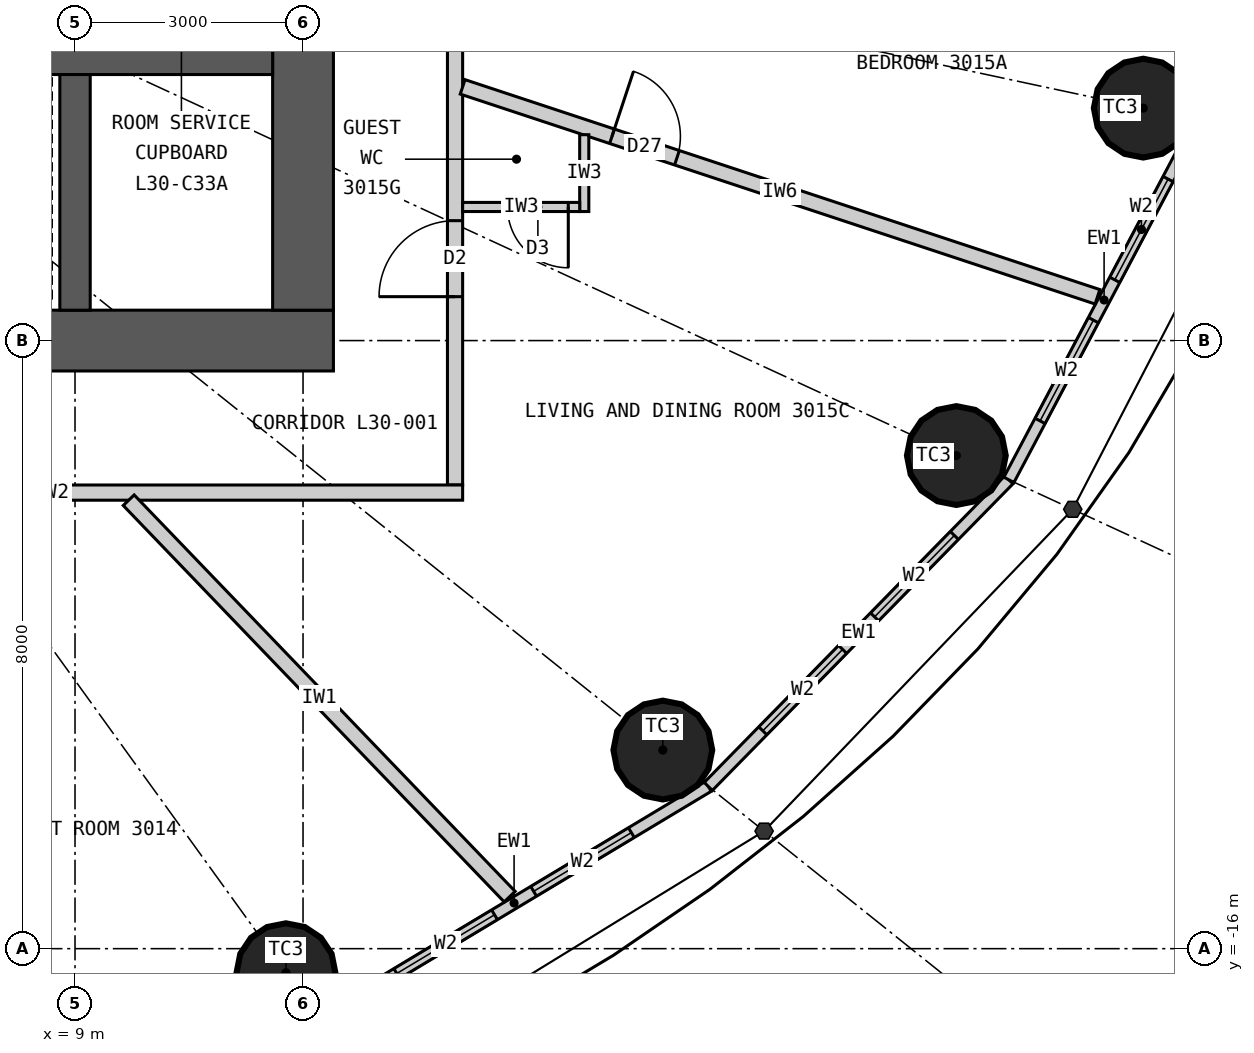
"""IFC4 building model, lengths in metres.
Left out: names, types, materials, properties, quantities, classifications, styles, units other than length and angle.
Written with IfcOpenShell. Run it as: python <this file> out.ifc"""

import sys

from ifc_helpers import new_model, si_unit, direction, frame, frame_2d, origin, origin_2d, place, context, subcontext, project, spatial, rectangle, circle, extrude, element, fill, save


model = new_model("IFC4")
c1 = context("Model", 3, precision=1e-05, world=origin(), true_north=direction((0.0, 1.0)))
c2 = subcontext(c1, "Body", "Model", "MODEL_VIEW")
j1 = project(units=[si_unit("LENGTHUNIT", "METRE"), si_unit("PLANEANGLEUNIT", "RADIAN")], contexts=[c1])
p1 = place(None, origin())
s1 = spatial("IfcSite", under=j1, at=p1, CompositionType="ELEMENT")
p2 = place(p1, origin())
s2 = spatial("IfcBuilding", under=s1, at=p2, CompositionType="ELEMENT")
p3 = place(p2, frame((0.0, 0.0, 118.8)))
s3 = spatial("IfcBuildingStorey", under=s2, at=p3, CompositionType="ELEMENT", Elevation=118.8)
for number, where, z_axis, x_axis in (
    (1, (11.775, -16.316, 0.0), (0.0, 0.0, 1.0), (1.0, 0.0, 0.0)),
    (2, (16.734, -13.387, 0.0), (0.0, 0.0, 1.0), (1.0, 0.0, 0.0)),
    (3, (20.596, -9.513, 0.0), (0.0, 0.0, 1.0), (1.0, 0.0, 0.0)),
    (4, (23.055, -4.942, 0.0), (0.0, 0.0, 1.0), (1.0, 0.0, 0.0)),
):
    element("IfcColumn", number, at=place(p3, frame(where, z_axis=z_axis, x_axis=x_axis)), inside=s3, PredefinedType="COLUMN", context=c2, shape_type="SweptSolid", body=[
        extrude(circle(Radius=0.65, at=origin_2d()), origin(), (0.0, 0.0, 1.0), 3.3),
    ])
p4 = place(p3, frame((12.4, -8.0, 0.0), z_axis=(0.0, 0.0, 1.0), x_axis=(-1.0, 0.0, 0.0)))
e5 = element("IfcWall", 5, at=p4, inside=s3, PredefinedType="SHEAR", context=c2, shape_type="SweptSolid", body=[
    extrude(rectangle(XDim=24.8, YDim=0.8, at=frame_2d((12.4, 0.0))), origin(), (0.0, 0.0, 1.0), 3.3),
])
p5 = place(p4, frame((11.1, 0.0, 0.0)))
e6 = element("IfcOpeningElement", 6, at=p5, cuts=e5, PredefinedType="OPENING", context=c2, shape_type="SweptSolid", body=[
    extrude(rectangle(XDim=1.2, YDim=2.2, at=frame_2d((0.6, 1.1))), frame((0.0, 0.41, 0.0), z_axis=(0.0, -1.0, 0.0), x_axis=(1.0, 0.0, 0.0)), (0.0, 0.0, 1.0), 0.82),
])
p6 = place(p4, frame((18.7, 0.0, 0.0)))
e7 = element("IfcOpeningElement", 7, at=p6, cuts=e5, PredefinedType="OPENING", context=c2, shape_type="SweptSolid", body=[
    extrude(rectangle(XDim=0.9, YDim=2.2, at=frame_2d((0.45, 1.1))), frame((0.0, 0.41, 0.0), z_axis=(0.0, -1.0, 0.0), x_axis=(1.0, 0.0, 0.0)), (0.0, 0.0, 1.0), 0.82),
])
p7 = place(p3, frame((12.0, -7.6, 0.0), z_axis=(0.0, 0.0, 1.0), x_axis=(0.0, 1.0, 0.0)))
e8 = element("IfcWall", 8, at=p7, inside=s3, PredefinedType="SHEAR", context=c2, shape_type="SweptSolid", body=[
    extrude(rectangle(XDim=15.2, YDim=0.8, at=frame_2d((7.6, 0.0))), origin(), (0.0, 0.0, 1.0), 3.3),
])
p8 = place(p7, frame((6.7, 0.0, 0.0)))
e9 = element("IfcOpeningElement", 9, at=p8, cuts=e8, PredefinedType="OPENING", context=c2, shape_type="SweptSolid", body=[
    extrude(rectangle(XDim=1.8, YDim=2.2, at=frame_2d((0.9, 1.1))), frame((0.0, 0.41, 0.0), z_axis=(0.0, -1.0, 0.0), x_axis=(1.0, 0.0, 0.0)), (0.0, 0.0, 1.0), 0.82),
])
p9 = place(p3, frame((-11.6, -4.3, 0.0), z_axis=(0.0, 0.0, 1.0), x_axis=(1.0, 0.0, 0.0)))
e10 = element("IfcWall", 10, at=p9, inside=s3, PredefinedType="SHEAR", context=c2, shape_type="SweptSolid", body=[
    extrude(rectangle(XDim=23.2, YDim=0.4, at=frame_2d((11.6, 0.0))), origin(), (0.0, 0.0, 1.0), 3.3),
])
p10 = place(p3, frame((9.0, -7.6, 0.0), z_axis=(0.0, 0.0, 1.0), x_axis=(0.0, 1.0, 0.0)))
e11 = element("IfcWall", 11, at=p10, inside=s3, PredefinedType="SHEAR", context=c2, shape_type="SweptSolid", body=[
    extrude(rectangle(XDim=3.1, YDim=0.4, at=frame_2d((1.55, 0.0))), origin(), (0.0, 0.0, 1.0), 3.3),
])
p11 = place(p3, frame((12.221, -16.935, 0.0), z_axis=(0.0, 0.0, 1.0), x_axis=(0.857308573723, 0.514802884044, 0.0)))
e12 = element("IfcWall", 12, at=p11, inside=s3, PredefinedType="ELEMENTEDWALL", context=c2, shape_type="SweptSolid", body=[
    extrude(rectangle(XDim=5.961, YDim=0.15, at=frame_2d((2.98, 0.0))), origin(), (0.0, 0.0, 1.0), 3.12),
])
p12 = place(p11, frame((1.181, 0.0, 0.9)))
e13 = element("IfcOpeningElement", 13, at=p12, cuts=e12, PredefinedType="OPENING", context=c2, shape_type="SweptSolid", body=[
    extrude(rectangle(XDim=1.5, YDim=1.9, at=frame_2d((0.75, 0.95))), frame((0.0, 0.085, 0.0), z_axis=(0.0, -1.0, 0.0), x_axis=(1.0, 0.0, 0.0)), (0.0, 0.0, 1.0), 0.17),
])
p13 = place(p11, frame((3.281, 0.0, 0.9)))
e14 = element("IfcOpeningElement", 14, at=p13, cuts=e12, PredefinedType="OPENING", context=c2, shape_type="SweptSolid", body=[
    extrude(rectangle(XDim=1.5, YDim=1.9, at=frame_2d((0.75, 0.95))), frame((0.0, 0.085, 0.0), z_axis=(0.0, -1.0, 0.0), x_axis=(1.0, 0.0, 0.0)), (0.0, 0.0, 1.0), 0.17),
])
p14 = place(p3, frame((17.332, -13.866, 0.0), z_axis=(0.0, 0.0, 1.0), x_axis=(0.700136650834, 0.714008872605, 0.0)))
e15 = element("IfcWall", 15, at=p14, inside=s3, PredefinedType="ELEMENTEDWALL", context=c2, shape_type="SweptSolid", body=[
    extrude(rectangle(XDim=5.649, YDim=0.15, at=frame_2d((2.825, 0.0))), origin(), (0.0, 0.0, 1.0), 3.12),
])
p15 = place(p14, frame((1.025, 0.0, 0.9)))
e16 = element("IfcOpeningElement", 16, at=p15, cuts=e15, PredefinedType="OPENING", context=c2, shape_type="SweptSolid", body=[
    extrude(rectangle(XDim=1.5, YDim=1.9, at=frame_2d((0.75, 0.95))), frame((0.0, 0.085, 0.0), z_axis=(0.0, -1.0, 0.0), x_axis=(1.0, 0.0, 0.0)), (0.0, 0.0, 1.0), 0.17),
])
p16 = place(p14, frame((3.125, 0.0, 0.9)))
e17 = element("IfcOpeningElement", 17, at=p16, cuts=e15, PredefinedType="OPENING", context=c2, shape_type="SweptSolid", body=[
    extrude(rectangle(XDim=1.5, YDim=1.9, at=frame_2d((0.75, 0.95))), frame((0.0, 0.085, 0.0), z_axis=(0.0, -1.0, 0.0), x_axis=(1.0, 0.0, 0.0)), (0.0, 0.0, 1.0), 0.17),
])
p17 = place(p3, frame((21.287, -9.832, 0.0), z_axis=(0.0, 0.0, 1.0), x_axis=(0.467814388454, 0.883826735257, 0.0)))
e18 = element("IfcWall", 18, at=p17, inside=s3, PredefinedType="ELEMENTEDWALL", context=c2, shape_type="SweptSolid", body=[
    extrude(rectangle(XDim=5.354, YDim=0.15, at=frame_2d((2.677, 0.0))), origin(), (0.0, 0.0, 1.0), 3.12),
])
p18 = place(p17, frame((0.877, 0.0, 0.9)))
e19 = element("IfcOpeningElement", 19, at=p18, cuts=e18, PredefinedType="OPENING", context=c2, shape_type="SweptSolid", body=[
    extrude(rectangle(XDim=1.5, YDim=1.9, at=frame_2d((0.75, 0.95))), frame((0.0, 0.085, 0.0), z_axis=(0.0, -1.0, 0.0), x_axis=(1.0, 0.0, 0.0)), (0.0, 0.0, 1.0), 0.17),
])
p19 = place(p17, frame((2.977, 0.0, 0.9)))
e20 = element("IfcOpeningElement", 20, at=p19, cuts=e18, PredefinedType="OPENING", context=c2, shape_type="SweptSolid", body=[
    extrude(rectangle(XDim=1.5, YDim=1.9, at=frame_2d((0.75, 0.95))), frame((0.0, 0.085, 0.0), z_axis=(0.0, -1.0, 0.0), x_axis=(1.0, 0.0, 0.0)), (0.0, 0.0, 1.0), 0.17),
])
p20 = place(p3, frame((14.0, -9.9, 0.0), z_axis=(0.0, 0.0, 1.0), x_axis=(0.0, 1.0, 0.0)))
e21 = element("IfcWall", 21, at=p20, inside=s3, PredefinedType="PARTITIONING", context=c2, shape_type="SweptSolid", body=[
    extrude(rectangle(XDim=19.8, YDim=0.2, at=frame_2d((9.9, 0.0))), origin(), (0.0, 0.0, 1.0), 3.12),
])
p21 = place(p20, frame((2.478, 0.0, 0.0)))
e22 = element("IfcOpeningElement", 22, at=p21, cuts=e21, PredefinedType="OPENING", context=c2, shape_type="SweptSolid", body=[
    extrude(rectangle(XDim=1.0, YDim=2.2, at=frame_2d((0.5, 1.1))), frame((0.0, 0.11, 0.0), z_axis=(0.0, -1.0, 0.0), x_axis=(1.0, 0.0, 0.0)), (0.0, 0.0, 1.0), 0.22),
])
p22 = place(p20, frame((8.838, 0.0, 0.0)))
e23 = element("IfcOpeningElement", 23, at=p22, cuts=e21, PredefinedType="OPENING", context=c2, shape_type="SweptSolid", body=[
    extrude(rectangle(XDim=1.0, YDim=2.2, at=frame_2d((0.5, 1.1))), frame((0.0, 0.11, 0.0), z_axis=(0.0, -1.0, 0.0), x_axis=(1.0, 0.0, 0.0)), (0.0, 0.0, 1.0), 0.22),
])
p23 = place(p20, frame((13.742, 0.0, 0.0)))
e24 = element("IfcOpeningElement", 24, at=p23, cuts=e21, PredefinedType="OPENING", context=c2, shape_type="SweptSolid", body=[
    extrude(rectangle(XDim=1.0, YDim=2.2, at=frame_2d((0.5, 1.1))), frame((0.0, 0.11, 0.0), z_axis=(0.0, -1.0, 0.0), x_axis=(1.0, 0.0, 0.0)), (0.0, 0.0, 1.0), 0.22),
])
p24 = place(p20, frame((18.698, 0.0, 0.0)))
e25 = element("IfcOpeningElement", 25, at=p24, cuts=e21, PredefinedType="OPENING", context=c2, shape_type="SweptSolid", body=[
    extrude(rectangle(XDim=1.0, YDim=2.2, at=frame_2d((0.5, 1.1))), frame((0.0, 0.11, 0.0), z_axis=(0.0, -1.0, 0.0), x_axis=(1.0, 0.0, 0.0)), (0.0, 0.0, 1.0), 0.22),
])
p25 = place(p3, frame((14.1, -10.0, 0.0), z_axis=(0.0, 0.0, 1.0), x_axis=(-1.0, 0.0, 0.0)))
e26 = element("IfcWall", 26, at=p25, inside=s3, PredefinedType="PARTITIONING", context=c2, shape_type="SweptSolid", body=[
    extrude(rectangle(XDim=10.817, YDim=0.2, at=frame_2d((5.409, 0.0))), origin(), (0.0, 0.0, 1.0), 3.12),
])
p26 = place(p3, frame((9.706, -10.1, 0.0), z_axis=(0.0, 0.0, 1.0), x_axis=(0.692944801824, -0.720990639069, 0.0)))
e27 = element("IfcWall", 27, at=p26, inside=s3, PredefinedType="PARTITIONING", context=c2, shape_type="SweptSolid", body=[
    extrude(rectangle(XDim=7.234, YDim=0.2, at=frame_2d((3.617, 0.0))), origin(), (0.0, 0.0, 1.0), 3.12),
])
p27 = place(p3, frame((14.1, -4.662, 0.0), z_axis=(0.0, 0.0, 1.0), x_axis=(0.949446466373, -0.313928984789, 0.0)))
e28 = element("IfcWall", 28, at=p27, inside=s3, PredefinedType="PARTITIONING", context=c2, shape_type="SweptSolid", body=[
    extrude(rectangle(XDim=8.797, YDim=0.2, at=frame_2d((4.399, 0.0))), origin(), (0.0, 0.0, 1.0), 3.12),
])
p28 = place(p27, frame((2.07, 0.0, 0.0)))
e29 = element("IfcOpeningElement", 29, at=p28, cuts=e28, PredefinedType="OPENING", context=c2, shape_type="SweptSolid", body=[
    extrude(rectangle(XDim=0.9, YDim=2.1, at=frame_2d((0.45, 1.05))), frame((0.0, 0.11, 0.0), z_axis=(0.0, -1.0, 0.0), x_axis=(1.0, 0.0, 0.0)), (0.0, 0.0, 1.0), 0.22),
])
p29 = place(p3, frame((15.7, -5.291, 0.0), z_axis=(0.0, 0.0, 1.0), x_axis=(0.0, -1.0, 0.0)))
e30 = element("IfcWall", 30, at=p29, inside=s3, PredefinedType="PARTITIONING", context=c2, shape_type="SweptSolid", body=[
    extrude(rectangle(XDim=1.011, YDim=0.12, at=frame_2d((0.505, 0.0))), origin(), (0.0, 0.0, 1.0), 3.12),
])
p30 = place(p3, frame((14.1, -6.242, 0.0), z_axis=(0.0, 0.0, 1.0), x_axis=(1.0, 0.0, 0.0)))
e31 = element("IfcWall", 31, at=p30, inside=s3, PredefinedType="PARTITIONING", context=c2, shape_type="SweptSolid", body=[
    extrude(rectangle(XDim=1.54, YDim=0.12, at=frame_2d((0.77, 0.0))), origin(), (0.0, 0.0, 1.0), 3.12),
])
p31 = place(p30, frame((0.59, 0.0, 0.0)))
e32 = element("IfcOpeningElement", 32, at=p31, cuts=e31, PredefinedType="OPENING", context=c2, shape_type="SweptSolid", body=[
    extrude(rectangle(XDim=0.8, YDim=2.1, at=frame_2d((0.4, 1.05))), frame((0.0, 0.07, 0.0), z_axis=(0.0, -1.0, 0.0), x_axis=(1.0, 0.0, 0.0)), (0.0, 0.0, 1.0), 0.14),
])
p32 = place(p12, origin())
e33 = element("IfcWindow", 33, at=p32, inside=s3, PartitioningType="SINGLE_PANEL", PredefinedType="WINDOW", context=c2, shape_type="SweptSolid", body=[
    extrude(rectangle(XDim=1.5, YDim=1.9, at=frame_2d((0.75, 0.95))), frame((0.0, 0.03, 0.0), z_axis=(0.0, -1.0, 0.0), x_axis=(1.0, 0.0, 0.0)), (0.0, 0.0, 1.0), 0.06),
])
fill(e13, e33)
p33 = place(p13, origin())
e34 = element("IfcWindow", 34, at=p33, inside=s3, PartitioningType="SINGLE_PANEL", PredefinedType="WINDOW", context=c2, shape_type="SweptSolid", body=[
    extrude(rectangle(XDim=1.5, YDim=1.9, at=frame_2d((0.75, 0.95))), frame((0.0, 0.03, 0.0), z_axis=(0.0, -1.0, 0.0), x_axis=(1.0, 0.0, 0.0)), (0.0, 0.0, 1.0), 0.06),
])
fill(e14, e34)
p34 = place(p15, origin())
e35 = element("IfcWindow", 35, at=p34, inside=s3, PartitioningType="SINGLE_PANEL", PredefinedType="WINDOW", context=c2, shape_type="SweptSolid", body=[
    extrude(rectangle(XDim=1.5, YDim=1.9, at=frame_2d((0.75, 0.95))), frame((0.0, 0.03, 0.0), z_axis=(0.0, -1.0, 0.0), x_axis=(1.0, 0.0, 0.0)), (0.0, 0.0, 1.0), 0.06),
])
fill(e16, e35)
p35 = place(p16, origin())
e36 = element("IfcWindow", 36, at=p35, inside=s3, PartitioningType="SINGLE_PANEL", PredefinedType="WINDOW", context=c2, shape_type="SweptSolid", body=[
    extrude(rectangle(XDim=1.5, YDim=1.9, at=frame_2d((0.75, 0.95))), frame((0.0, 0.03, 0.0), z_axis=(0.0, -1.0, 0.0), x_axis=(1.0, 0.0, 0.0)), (0.0, 0.0, 1.0), 0.06),
])
fill(e17, e36)
p36 = place(p18, origin())
e37 = element("IfcWindow", 37, at=p36, inside=s3, PartitioningType="SINGLE_PANEL", PredefinedType="WINDOW", context=c2, shape_type="SweptSolid", body=[
    extrude(rectangle(XDim=1.5, YDim=1.9, at=frame_2d((0.75, 0.95))), frame((0.0, 0.03, 0.0), z_axis=(0.0, -1.0, 0.0), x_axis=(1.0, 0.0, 0.0)), (0.0, 0.0, 1.0), 0.06),
])
fill(e19, e37)
p37 = place(p19, origin())
e38 = element("IfcWindow", 38, at=p37, inside=s3, PartitioningType="SINGLE_PANEL", PredefinedType="WINDOW", context=c2, shape_type="SweptSolid", body=[
    extrude(rectangle(XDim=1.5, YDim=1.9, at=frame_2d((0.75, 0.95))), frame((0.0, 0.03, 0.0), z_axis=(0.0, -1.0, 0.0), x_axis=(1.0, 0.0, 0.0)), (0.0, 0.0, 1.0), 0.06),
])
fill(e20, e38)
p38 = place(p31, origin())
e39 = element("IfcDoor", 39, at=p38, inside=s3, OperationType="SINGLE_SWING_RIGHT", PredefinedType="DOOR", context=c2, shape_type="SweptSolid", body=[
    extrude(rectangle(XDim=0.8, YDim=2.1, at=frame_2d((0.4, 1.05))), frame((0.0, 0.025, 0.0), z_axis=(0.0, -1.0, 0.0), x_axis=(1.0, 0.0, 0.0)), (0.0, 0.0, 1.0), 0.05),
])
fill(e32, e39)
p39 = place(p21, origin())
e40 = element("IfcDoor", 40, at=p39, inside=s3, OperationType="SINGLE_SWING_LEFT", PredefinedType="DOOR", context=c2, shape_type="SweptSolid", body=[
    extrude(rectangle(XDim=1.0, YDim=2.2, at=frame_2d((0.5, 1.1))), frame((0.0, 0.025, 0.0), z_axis=(0.0, -1.0, 0.0), x_axis=(1.0, 0.0, 0.0)), (0.0, 0.0, 1.0), 0.05),
])
fill(e22, e40)
p40 = place(p28, origin())
e41 = element("IfcDoor", 41, at=p40, inside=s3, OperationType="SINGLE_SWING_LEFT", PredefinedType="DOOR", context=c2, shape_type="SweptSolid", body=[
    extrude(rectangle(XDim=0.9, YDim=2.1, at=frame_2d((0.45, 1.05))), frame((0.0, 0.025, 0.0), z_axis=(0.0, -1.0, 0.0), x_axis=(1.0, 0.0, 0.0)), (0.0, 0.0, 1.0), 0.05),
])
fill(e29, e41)
save(model, sys.argv[1])
